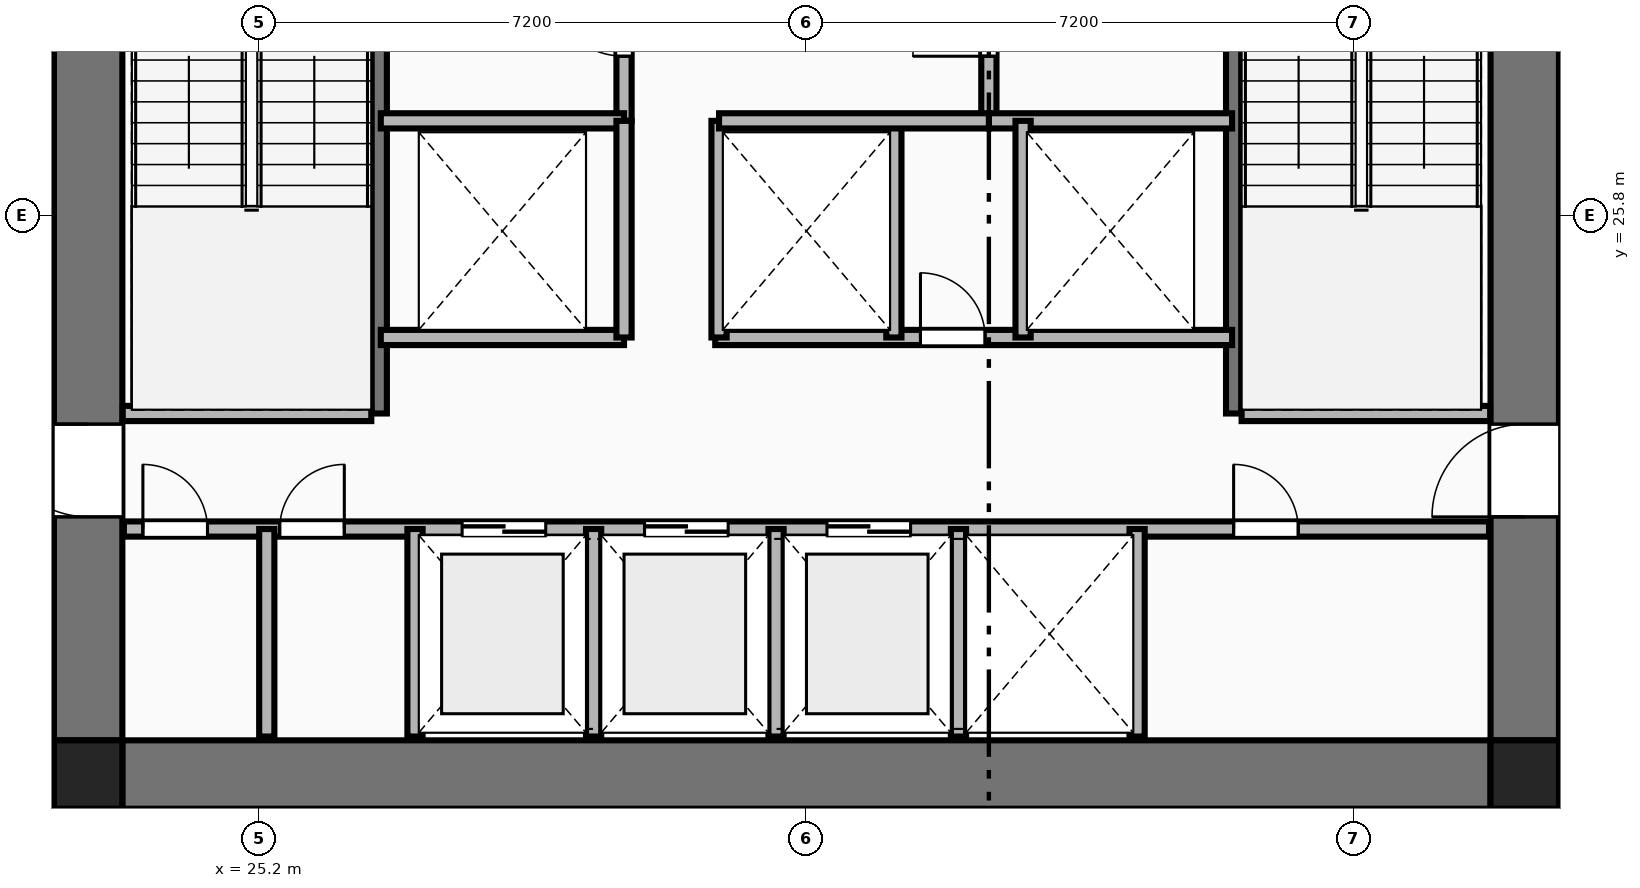
"""IFC4 building model, lengths in metres.
Left out: names, types, materials, properties, quantities, classifications, styles, units other than length and angle.
Written with IfcOpenShell. Run it as: python <this file> out.ifc"""

import sys

from ifc_helpers import new_model, si_unit, direction, frame, frame_2d, origin, origin_2d, place, context, subcontext, project, spatial, rectangle, extrude, element, fill, save


model = new_model("IFC4")
c1 = context("Model", 3, precision=1e-05, world=origin(), true_north=direction((0.0, 1.0)))
c2 = subcontext(c1, "Body", "Model", "MODEL_VIEW")
j1 = project(units=[si_unit("LENGTHUNIT", "METRE"), si_unit("PLANEANGLEUNIT", "RADIAN")], contexts=[c1])
p1 = place(None, origin())
s1 = spatial("IfcSite", under=j1, at=p1, CompositionType="ELEMENT")
p2 = place(p1, origin())
s2 = spatial("IfcBuilding", under=s1, at=p2, CompositionType="ELEMENT")
p3 = place(p2, frame((0.0, 0.0, 42.65)))
s3 = spatial("IfcBuildingStorey", under=s2, at=p3, CompositionType="ELEMENT", Elevation=42.65)
for number, where, z_axis, x_axis in (
    (1, (22.95, 18.45, 0.0), (0.0, 0.0, 1.0), (1.0, 0.0, 0.0)),
    (2, (41.85, 18.45, 0.0), (0.0, 0.0, 1.0), (1.0, 0.0, 0.0)),
):
    element("IfcColumn", number, at=place(p3, frame(where, z_axis=z_axis, x_axis=x_axis)), inside=s3, PredefinedType="COLUMN", context=c2, shape_type="SweptSolid", body=[
        extrude(rectangle(XDim=0.9, YDim=0.9, at=origin_2d()), origin(), (0.0, 0.0, 1.0), 3.55),
    ])
p4 = place(p3, frame((23.4, 18.45, 0.0), z_axis=(0.0, 0.0, 1.0), x_axis=(1.0, 0.0, 0.0)))
e3 = element("IfcWall", 3, at=p4, inside=s3, PredefinedType="SHEAR", context=c2, shape_type="SweptSolid", body=[
    extrude(rectangle(XDim=18.0, YDim=0.9, at=frame_2d((9.0, 0.0))), origin(), (0.0, 0.0, 1.0), 3.33),
])
p5 = place(p3, frame((22.95, 18.9, 0.0), z_axis=(0.0, 0.0, 1.0), x_axis=(0.0, 1.0, 0.0)))
e4 = element("IfcWall", 4, at=p5, inside=s3, PredefinedType="SHEAR", context=c2, shape_type="SweptSolid", body=[
    extrude(rectangle(XDim=14.0, YDim=0.9, at=frame_2d((7.0, 0.0))), origin(), (0.0, 0.0, 1.0), 3.33),
])
p6 = place(p5, frame((2.94, 0.0, 0.0)))
e5 = element("IfcOpeningElement", 5, at=p6, cuts=e4, PredefinedType="OPENING", context=c2, shape_type="SweptSolid", body=[
    extrude(rectangle(XDim=1.22, YDim=2.25, at=frame_2d((0.61, 1.125))), frame((0.0, 0.46, 0.0), z_axis=(0.0, -1.0, 0.0), x_axis=(1.0, 0.0, 0.0)), (0.0, 0.0, 1.0), 0.92),
])
p7 = place(p3, frame((41.85, 18.9, 0.0), z_axis=(0.0, 0.0, 1.0), x_axis=(0.0, 1.0, 0.0)))
e6 = element("IfcWall", 6, at=p7, inside=s3, PredefinedType="SHEAR", context=c2, shape_type="SweptSolid", body=[
    extrude(rectangle(XDim=14.0, YDim=0.9, at=frame_2d((7.0, 0.0))), origin(), (0.0, 0.0, 1.0), 3.33),
])
p8 = place(p7, frame((2.94, 0.0, 0.0)))
e7 = element("IfcOpeningElement", 7, at=p8, cuts=e6, PredefinedType="OPENING", context=c2, shape_type="SweptSolid", body=[
    extrude(rectangle(XDim=1.22, YDim=2.25, at=frame_2d((0.61, 1.125))), frame((0.0, 0.46, 0.0), z_axis=(0.0, -1.0, 0.0), x_axis=(1.0, 0.0, 0.0)), (0.0, 0.0, 1.0), 0.92),
])
p9 = place(p3, frame((26.78, 23.2, 0.0), z_axis=(0.0, 0.0, 1.0), x_axis=(0.0, 1.0, 0.0)))
e8 = element("IfcWall", 8, at=p9, inside=s3, PredefinedType="SHEAR", context=c2, shape_type="SweptSolid", body=[
    extrude(rectangle(XDim=6.78, YDim=0.2, at=frame_2d((3.39, 0.0))), origin(), (0.0, 0.0, 1.0), 3.55),
])
p10 = place(p9, frame((5.32, 0.0, 0.0)))
e9 = element("IfcOpeningElement", 9, at=p10, cuts=e8, PredefinedType="OPENING", context=c2, shape_type="SweptSolid", body=[
    extrude(rectangle(XDim=1.05, YDim=2.15, at=frame_2d((0.525, 1.075))), frame((0.0, 0.11, 0.0), z_axis=(0.0, -1.0, 0.0), x_axis=(1.0, 0.0, 0.0)), (0.0, 0.0, 1.0), 0.22),
])
p11 = place(p3, frame((23.405, 23.2, 0.0), z_axis=(0.0, 0.0, 1.0), x_axis=(1.0, 0.0, 0.0)))
e10 = element("IfcWall", 10, at=p11, inside=s3, PredefinedType="PLUMBINGWALL", context=c2, shape_type="SweptSolid", body=[
    extrude(rectangle(XDim=3.27, YDim=0.2, at=frame_2d((1.635, 0.0))), origin(), (0.0, 0.0, 1.0), 3.33),
])
p12 = place(p3, frame((38.02, 23.2, 0.0), z_axis=(0.0, 0.0, 1.0), x_axis=(0.0, 1.0, 0.0)))
e11 = element("IfcWall", 11, at=p12, inside=s3, PredefinedType="SHEAR", context=c2, shape_type="SweptSolid", body=[
    extrude(rectangle(XDim=6.78, YDim=0.2, at=frame_2d((3.39, 0.0))), origin(), (0.0, 0.0, 1.0), 3.55),
])
p13 = place(p12, frame((5.32, 0.0, 0.0)))
e12 = element("IfcOpeningElement", 12, at=p13, cuts=e11, PredefinedType="OPENING", context=c2, shape_type="SweptSolid", body=[
    extrude(rectangle(XDim=1.05, YDim=2.15, at=frame_2d((0.525, 1.075))), frame((0.0, 0.11, 0.0), z_axis=(0.0, -1.0, 0.0), x_axis=(1.0, 0.0, 0.0)), (0.0, 0.0, 1.0), 0.22),
])
p14 = place(p3, frame((38.125, 23.2, 0.0), z_axis=(0.0, 0.0, 1.0), x_axis=(1.0, 0.0, 0.0)))
e13 = element("IfcWall", 13, at=p14, inside=s3, PredefinedType="PLUMBINGWALL", context=c2, shape_type="SweptSolid", body=[
    extrude(rectangle(XDim=3.27, YDim=0.2, at=frame_2d((1.635, 0.0))), origin(), (0.0, 0.0, 1.0), 3.33),
])
p15 = place(p3, frame((30.0, 27.05, 0.0), z_axis=(0.0, 0.0, 1.0), x_axis=(0.0, 1.0, 0.0)))
e14 = element("IfcWall", 14, at=p15, inside=s3, PredefinedType="PLUMBINGWALL", context=c2, shape_type="SweptSolid", body=[
    extrude(rectangle(XDim=2.75, YDim=0.2, at=frame_2d((1.375, 0.0))), origin(), (0.0, 0.0, 1.0), 3.33),
])
p16 = place(p15, frame((0.85, 0.0, 0.0)))
e15 = element("IfcOpeningElement", 15, at=p16, cuts=e14, PredefinedType="OPENING", context=c2, shape_type="SweptSolid", body=[
    extrude(rectangle(XDim=1.0, YDim=2.15, at=frame_2d((0.5, 1.075))), frame((0.0, 0.11, 0.0), z_axis=(0.0, -1.0, 0.0), x_axis=(1.0, 0.0, 0.0)), (0.0, 0.0, 1.0), 0.22),
])
p17 = place(p3, frame((26.8, 27.05, 0.0), z_axis=(0.0, 0.0, 1.0), x_axis=(1.0, 0.0, 0.0)))
e16 = element("IfcWall", 16, at=p17, inside=s3, PredefinedType="PLUMBINGWALL", context=c2, shape_type="SweptSolid", body=[
    extrude(rectangle(XDim=3.2, YDim=0.2, at=frame_2d((1.6, 0.0))), origin(), (0.0, 0.0, 1.0), 3.33),
])
p18 = place(p3, frame((34.8, 27.05, 0.0), z_axis=(0.0, 0.0, 1.0), x_axis=(0.0, 1.0, 0.0)))
e17 = element("IfcWall", 17, at=p18, inside=s3, PredefinedType="PLUMBINGWALL", context=c2, shape_type="SweptSolid", body=[
    extrude(rectangle(XDim=2.75, YDim=0.2, at=frame_2d((1.375, 0.0))), origin(), (0.0, 0.0, 1.0), 3.33),
])
p19 = place(p18, frame((0.85, 0.0, 0.0)))
e18 = element("IfcOpeningElement", 18, at=p19, cuts=e17, PredefinedType="OPENING", context=c2, shape_type="SweptSolid", body=[
    extrude(rectangle(XDim=1.0, YDim=2.15, at=frame_2d((0.5, 1.075))), frame((0.0, 0.11, 0.0), z_axis=(0.0, -1.0, 0.0), x_axis=(1.0, 0.0, 0.0)), (0.0, 0.0, 1.0), 0.22),
])
for number, where, z_axis, x_axis in (
    (19, (34.8, 27.05, 0.0), (0.0, 0.0, 1.0), (1.0, 0.0, 0.0)),
    (20, (26.8, 24.2, 0.0), (0.0, 0.0, 1.0), (1.0, 0.0, 0.0)),
):
    element("IfcWall", number, at=place(p3, frame(where, z_axis=z_axis, x_axis=x_axis)), inside=s3, PredefinedType="PLUMBINGWALL", context=c2, shape_type="SweptSolid", body=[
        extrude(rectangle(XDim=3.2, YDim=0.2, at=frame_2d((1.6, 0.0))), origin(), (0.0, 0.0, 1.0), 3.33),
    ])
p20 = place(p3, frame((30.0, 24.2, 0.0), z_axis=(0.0, 0.0, 1.0), x_axis=(0.0, 1.0, 0.0)))
e21 = element("IfcWall", 21, at=p20, inside=s3, PredefinedType="PLUMBINGWALL", context=c2, shape_type="SweptSolid", body=[
    extrude(rectangle(XDim=2.85, YDim=0.2, at=frame_2d((1.425, 0.0))), origin(), (0.0, 0.0, 1.0), 3.33),
])
p21 = place(p3, frame((31.2, 24.2, 0.0), z_axis=(0.0, 0.0, 1.0), x_axis=(1.0, 0.0, 0.0)))
e22 = element("IfcWall", 22, at=p21, inside=s3, PredefinedType="PLUMBINGWALL", context=c2, shape_type="SweptSolid", body=[
    extrude(rectangle(XDim=6.8, YDim=0.2, at=frame_2d((3.4, 0.0))), origin(), (0.0, 0.0, 1.0), 3.33),
])
p22 = place(p21, frame((2.7, 0.0, 0.0)))
e23 = element("IfcOpeningElement", 23, at=p22, cuts=e22, PredefinedType="OPENING", context=c2, shape_type="SweptSolid", body=[
    extrude(rectangle(XDim=0.85, YDim=2.05, at=frame_2d((0.425, 1.025))), frame((0.0, 0.11, 0.0), z_axis=(0.0, -1.0, 0.0), x_axis=(1.0, 0.0, 0.0)), (0.0, 0.0, 1.0), 0.22),
])
for number, where, z_axis, x_axis in (
    (24, (31.25, 24.2, 0.0), (0.0, 0.0, 1.0), (0.0, 1.0, 0.0)),
    (25, (33.55, 24.2, 0.0), (0.0, 0.0, 1.0), (0.0, 1.0, 0.0)),
    (26, (35.25, 24.2, 0.0), (0.0, 0.0, 1.0), (0.0, 1.0, 0.0)),
):
    element("IfcWall", number, at=place(p3, frame(where, z_axis=z_axis, x_axis=x_axis)), inside=s3, PredefinedType="PLUMBINGWALL", context=c2, shape_type="SweptSolid", body=[
        extrude(rectangle(XDim=2.85, YDim=0.2, at=frame_2d((1.425, 0.0))), origin(), (0.0, 0.0, 1.0), 3.33),
    ])
p23 = place(p3, frame((31.25, 27.05, 0.0), z_axis=(0.0, 0.0, 1.0), x_axis=(1.0, 0.0, 0.0)))
e27 = element("IfcWall", 27, at=p23, inside=s3, PredefinedType="PLUMBINGWALL", context=c2, shape_type="SweptSolid", body=[
    extrude(rectangle(XDim=3.55, YDim=0.2, at=frame_2d((1.775, 0.0))), origin(), (0.0, 0.0, 1.0), 3.33),
])
p24 = place(p3, frame((23.42, 21.68, 0.0), z_axis=(0.0, 0.0, 1.0), x_axis=(1.0, 0.0, 0.0)))
e28 = element("IfcWall", 28, at=p24, inside=s3, PredefinedType="PLUMBINGWALL", context=c2, shape_type="SweptSolid", body=[
    extrude(rectangle(XDim=17.96, YDim=0.2, at=frame_2d((8.98, 0.0))), origin(), (0.0, 0.0, 1.0), 3.33),
])
p25 = place(p24, frame((4.45, 0.0, 0.0)))
e29 = element("IfcOpeningElement", 29, at=p25, cuts=e28, PredefinedType="OPENING", context=c2, shape_type="SweptSolid", body=[
    extrude(rectangle(XDim=1.1, YDim=2.2, at=frame_2d((0.55, 1.1))), frame((0.0, 0.11, 0.0), z_axis=(0.0, -1.0, 0.0), x_axis=(1.0, 0.0, 0.0)), (0.0, 0.0, 1.0), 0.22),
])
p26 = place(p24, frame((6.85, 0.0, 0.0)))
e30 = element("IfcOpeningElement", 30, at=p26, cuts=e28, PredefinedType="OPENING", context=c2, shape_type="SweptSolid", body=[
    extrude(rectangle(XDim=1.1, YDim=2.2, at=frame_2d((0.55, 1.1))), frame((0.0, 0.11, 0.0), z_axis=(0.0, -1.0, 0.0), x_axis=(1.0, 0.0, 0.0)), (0.0, 0.0, 1.0), 0.22),
])
p27 = place(p24, frame((9.25, 0.0, 0.0)))
e31 = element("IfcOpeningElement", 31, at=p27, cuts=e28, PredefinedType="OPENING", context=c2, shape_type="SweptSolid", body=[
    extrude(rectangle(XDim=1.1, YDim=2.2, at=frame_2d((0.55, 1.1))), frame((0.0, 0.11, 0.0), z_axis=(0.0, -1.0, 0.0), x_axis=(1.0, 0.0, 0.0)), (0.0, 0.0, 1.0), 0.22),
])
p28 = place(p24, frame((0.25, 0.0, 0.0)))
e32 = element("IfcOpeningElement", 32, at=p28, cuts=e28, PredefinedType="OPENING", context=c2, shape_type="SweptSolid", body=[
    extrude(rectangle(XDim=0.85, YDim=2.05, at=frame_2d((0.425, 1.025))), frame((0.0, 0.11, 0.0), z_axis=(0.0, -1.0, 0.0), x_axis=(1.0, 0.0, 0.0)), (0.0, 0.0, 1.0), 0.22),
])
p29 = place(p24, frame((2.05, 0.0, 0.0)))
e33 = element("IfcOpeningElement", 33, at=p29, cuts=e28, PredefinedType="OPENING", context=c2, shape_type="SweptSolid", body=[
    extrude(rectangle(XDim=0.85, YDim=2.05, at=frame_2d((0.425, 1.025))), frame((0.0, 0.11, 0.0), z_axis=(0.0, -1.0, 0.0), x_axis=(1.0, 0.0, 0.0)), (0.0, 0.0, 1.0), 0.22),
])
p30 = place(p24, frame((14.6, 0.0, 0.0)))
e34 = element("IfcOpeningElement", 34, at=p30, cuts=e28, PredefinedType="OPENING", context=c2, shape_type="SweptSolid", body=[
    extrude(rectangle(XDim=0.85, YDim=2.05, at=frame_2d((0.425, 1.025))), frame((0.0, 0.11, 0.0), z_axis=(0.0, -1.0, 0.0), x_axis=(1.0, 0.0, 0.0)), (0.0, 0.0, 1.0), 0.22),
])
for number, where, z_axis, x_axis in (
    (35, (27.25, 18.95, 0.0), (0.0, 0.0, 1.0), (0.0, 1.0, 0.0)),
    (36, (29.6, 18.95, 0.0), (0.0, 0.0, 1.0), (0.0, 1.0, 0.0)),
    (37, (32.0, 18.95, 0.0), (0.0, 0.0, 1.0), (0.0, 1.0, 0.0)),
    (38, (34.4, 18.95, 0.0), (0.0, 0.0, 1.0), (0.0, 1.0, 0.0)),
    (39, (36.75, 18.95, 0.0), (0.0, 0.0, 1.0), (0.0, 1.0, 0.0)),
    (40, (25.3, 18.95, 0.0), (0.0, 0.0, 1.0), (0.0, 1.0, 0.0)),
):
    element("IfcWall", number, at=place(p3, frame(where, z_axis=z_axis, x_axis=x_axis)), inside=s3, PredefinedType="PLUMBINGWALL", context=c2, shape_type="SweptSolid", body=[
        extrude(rectangle(XDim=2.73, YDim=0.2, at=frame_2d((1.365, 0.0))), origin(), (0.0, 0.0, 1.0), 3.33),
    ])
p31 = place(p6, origin())
e41 = element("IfcDoor", 41, at=p31, inside=s3, OperationType="SINGLE_SWING_RIGHT", PredefinedType="DOOR", context=c2, shape_type="SweptSolid", body=[
    extrude(rectangle(XDim=1.22, YDim=2.25, at=frame_2d((0.61, 1.125))), frame((0.0, 0.025, 0.0), z_axis=(0.0, -1.0, 0.0), x_axis=(1.0, 0.0, 0.0)), (0.0, 0.0, 1.0), 0.05),
])
fill(e5, e41)
p32 = place(p8, origin())
e42 = element("IfcDoor", 42, at=p32, inside=s3, OperationType="SINGLE_SWING_LEFT", PredefinedType="DOOR", context=c2, shape_type="SweptSolid", body=[
    extrude(rectangle(XDim=1.22, YDim=2.25, at=frame_2d((0.61, 1.125))), frame((0.0, 0.025, 0.0), z_axis=(0.0, -1.0, 0.0), x_axis=(1.0, 0.0, 0.0)), (0.0, 0.0, 1.0), 0.05),
])
fill(e7, e42)
p33 = place(p16, origin())
e43 = element("IfcDoor", 43, at=p33, inside=s3, OperationType="SINGLE_SWING_RIGHT", PredefinedType="DOOR", context=c2, shape_type="SweptSolid", body=[
    extrude(rectangle(XDim=1.0, YDim=2.15, at=frame_2d((0.5, 1.075))), frame((0.0, 0.025, 0.0), z_axis=(0.0, -1.0, 0.0), x_axis=(1.0, 0.0, 0.0)), (0.0, 0.0, 1.0), 0.05),
])
fill(e15, e43)
p34 = place(p19, origin())
e44 = element("IfcDoor", 44, at=p34, inside=s3, OperationType="SINGLE_SWING_LEFT", PredefinedType="DOOR", context=c2, shape_type="SweptSolid", body=[
    extrude(rectangle(XDim=1.0, YDim=2.15, at=frame_2d((0.5, 1.075))), frame((0.0, 0.025, 0.0), z_axis=(0.0, -1.0, 0.0), x_axis=(1.0, 0.0, 0.0)), (0.0, 0.0, 1.0), 0.05),
])
fill(e18, e44)
p35 = place(p22, origin())
e45 = element("IfcDoor", 45, at=p35, inside=s3, OperationType="SINGLE_SWING_LEFT", PredefinedType="DOOR", context=c2, shape_type="SweptSolid", body=[
    extrude(rectangle(XDim=0.85, YDim=2.05, at=frame_2d((0.425, 1.025))), frame((0.0, 0.025, 0.0), z_axis=(0.0, -1.0, 0.0), x_axis=(1.0, 0.0, 0.0)), (0.0, 0.0, 1.0), 0.05),
])
fill(e23, e45)
p36 = place(p25, origin())
e46 = element("IfcDoor", 46, at=p36, inside=s3, OperationType="DOUBLE_DOOR_SLIDING", PredefinedType="DOOR", context=c2, shape_type="SweptSolid", body=[
    extrude(rectangle(XDim=1.1, YDim=2.2, at=frame_2d((0.55, 1.1))), frame((0.0, 0.025, 0.0), z_axis=(0.0, -1.0, 0.0), x_axis=(1.0, 0.0, 0.0)), (0.0, 0.0, 1.0), 0.05),
])
fill(e29, e46)
p37 = place(p26, origin())
e47 = element("IfcDoor", 47, at=p37, inside=s3, OperationType="DOUBLE_DOOR_SLIDING", PredefinedType="DOOR", context=c2, shape_type="SweptSolid", body=[
    extrude(rectangle(XDim=1.1, YDim=2.2, at=frame_2d((0.55, 1.1))), frame((0.0, 0.025, 0.0), z_axis=(0.0, -1.0, 0.0), x_axis=(1.0, 0.0, 0.0)), (0.0, 0.0, 1.0), 0.05),
])
fill(e30, e47)
p38 = place(p27, origin())
e48 = element("IfcDoor", 48, at=p38, inside=s3, OperationType="DOUBLE_DOOR_SLIDING", PredefinedType="DOOR", context=c2, shape_type="SweptSolid", body=[
    extrude(rectangle(XDim=1.1, YDim=2.2, at=frame_2d((0.55, 1.1))), frame((0.0, 0.025, 0.0), z_axis=(0.0, -1.0, 0.0), x_axis=(1.0, 0.0, 0.0)), (0.0, 0.0, 1.0), 0.05),
])
fill(e31, e48)
p39 = place(p28, origin())
e49 = element("IfcDoor", 49, at=p39, inside=s3, OperationType="SINGLE_SWING_LEFT", PredefinedType="DOOR", context=c2, shape_type="SweptSolid", body=[
    extrude(rectangle(XDim=0.85, YDim=2.05, at=frame_2d((0.425, 1.025))), frame((0.0, 0.025, 0.0), z_axis=(0.0, -1.0, 0.0), x_axis=(1.0, 0.0, 0.0)), (0.0, 0.0, 1.0), 0.05),
])
fill(e32, e49)
p40 = place(p29, origin())
e50 = element("IfcDoor", 50, at=p40, inside=s3, OperationType="SINGLE_SWING_RIGHT", PredefinedType="DOOR", context=c2, shape_type="SweptSolid", body=[
    extrude(rectangle(XDim=0.85, YDim=2.05, at=frame_2d((0.425, 1.025))), frame((0.0, 0.025, 0.0), z_axis=(0.0, -1.0, 0.0), x_axis=(1.0, 0.0, 0.0)), (0.0, 0.0, 1.0), 0.05),
])
fill(e33, e50)
p41 = place(p30, origin())
e51 = element("IfcDoor", 51, at=p41, inside=s3, OperationType="SINGLE_SWING_LEFT", PredefinedType="DOOR", context=c2, shape_type="SweptSolid", body=[
    extrude(rectangle(XDim=0.85, YDim=2.05, at=frame_2d((0.425, 1.025))), frame((0.0, 0.025, 0.0), z_axis=(0.0, -1.0, 0.0), x_axis=(1.0, 0.0, 0.0)), (0.0, 0.0, 1.0), 0.05),
])
fill(e34, e51)
save(model, sys.argv[1])
